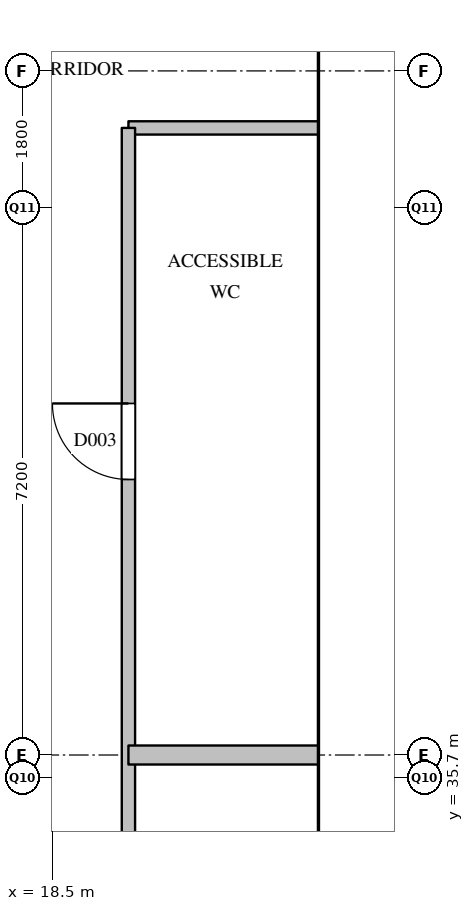
"""IFC4 building model, lengths in metres.
Left out: names, types, materials, properties, quantities, classifications, styles, units other than length and angle.
Written with IfcOpenShell. Run it as: python <this file> out.ifc"""

import sys

from ifc_helpers import new_model, si_unit, direction, frame, frame_2d, origin, place, context, subcontext, project, spatial, rectangle, extrude, element, fill, save


model = new_model("IFC4")
c1 = context("Model", 3, precision=1e-05, world=origin(), true_north=direction((0.0, 1.0)))
c2 = subcontext(c1, "Body", "Model", "MODEL_VIEW")
j1 = project(units=[si_unit("LENGTHUNIT", "METRE"), si_unit("PLANEANGLEUNIT", "RADIAN")], contexts=[c1])
p1 = place(None, origin())
s1 = spatial("IfcSite", under=j1, at=p1, CompositionType="ELEMENT")
p2 = place(p1, origin())
s2 = spatial("IfcBuilding", under=s1, at=p2, CompositionType="ELEMENT")
p3 = place(p2, frame((0.0, 0.0, 218.9)))
s3 = spatial("IfcBuildingStorey", under=s2, at=p3, CompositionType="ELEMENT", Elevation=218.9)
p4 = place(p3, frame((19.5, 44.25, 0.0), z_axis=(0.0, 0.0, 1.0), x_axis=(1.0, 0.0, 0.0)))
e1 = element("IfcWall", 1, at=p4, inside=s3, PredefinedType="PARTITIONING", context=c2, shape_type="SweptSolid", body=[
    extrude(rectangle(XDim=2.5, YDim=0.175, at=frame_2d((1.25, 0.0))), origin(), (0.0, 0.0, 1.0), 3.6),
])
p5 = place(p3, frame((19.5, 28.5, 0.0), z_axis=(0.0, 0.0, 1.0), x_axis=(0.0, 1.0, 0.0)))
e2 = element("IfcWall", 2, at=p5, inside=s3, PredefinedType="PARTITIONING", context=c2, shape_type="SweptSolid", body=[
    extrude(rectangle(XDim=15.75, YDim=0.175, at=frame_2d((7.875, 0.0))), origin(), (0.0, 0.0, 1.0), 3.6),
])
p6 = place(p5, frame((11.125, 0.0, 0.0)))
e3 = element("IfcOpeningElement", 3, at=p6, cuts=e2, PredefinedType="OPENING", context=c2, shape_type="SweptSolid", body=[
    extrude(rectangle(XDim=1.0, YDim=2.1, at=frame_2d((0.5, 1.05))), frame((0.0, 0.097, 0.0), z_axis=(0.0, -1.0, 0.0), x_axis=(1.0, 0.0, 0.0)), (0.0, 0.0, 1.0), 0.195),
])
p7 = place(p3, frame((19.5, 36.0, 0.0), z_axis=(0.0, 0.0, 1.0), x_axis=(1.0, 0.0, 0.0)))
e4 = element("IfcWall", 4, at=p7, inside=s3, PredefinedType="PARTITIONING", context=c2, shape_type="SweptSolid", body=[
    extrude(rectangle(XDim=2.5, YDim=0.25, at=frame_2d((1.25, 0.0))), origin(), (0.0, 0.0, 1.0), 3.6),
])
p8 = place(p6, origin())
e5 = element("IfcDoor", 5, at=p8, inside=s3, OperationType="SINGLE_SWING_RIGHT", PredefinedType="DOOR", context=c2, shape_type="SweptSolid", body=[
    extrude(rectangle(XDim=1.0, YDim=2.1, at=frame_2d((0.5, 1.05))), frame((0.0, 0.025, 0.0), z_axis=(0.0, -1.0, 0.0), x_axis=(1.0, 0.0, 0.0)), (0.0, 0.0, 1.0), 0.05),
])
fill(e3, e5)
save(model, sys.argv[1])
